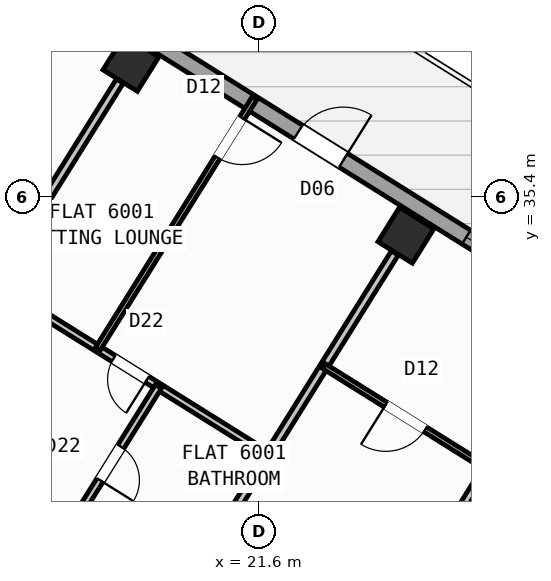
"""IFC4 building model, lengths in metres.
Left out: names, types, materials, properties, quantities, classifications, styles, units other than length and angle.
Written with IfcOpenShell. Run it as: python <this file> out.ifc"""

import sys

from ifc_helpers import new_model, si_unit, direction, frame, frame_2d, origin, origin_2d, place, context, subcontext, project, spatial, rectangle, hollow_rectangle, extrude, source, transform, mapped, element, fill, save


model = new_model("IFC4")
c1 = context("Model", 3, precision=1e-05, world=origin(), true_north=direction((0.0, 1.0)))
c2 = subcontext(c1, "Body", "Model", "MODEL_VIEW")
j1 = project(units=[si_unit("LENGTHUNIT", "METRE"), si_unit("PLANEANGLEUNIT", "RADIAN")], contexts=[c1])
p1 = place(None, origin())
s1 = spatial("IfcSite", under=j1, at=p1, CompositionType="ELEMENT")
p2 = place(p1, origin())
s2 = spatial("IfcBuilding", under=s1, at=p2, CompositionType="ELEMENT")
p3 = place(p2, frame((0.0, 0.0, 238.5)))
s3 = spatial("IfcBuildingStorey", under=s2, at=p3, CompositionType="ELEMENT", Elevation=238.5)
m1 = source(origin(), c2, "Body", "SweptSolid", [
    extrude(hollow_rectangle(XDim=0.8, YDim=0.8, WallThickness=0.032, at=origin_2d()), origin(), (0.0, 0.0, 1.0), 3.6),
])
for number, where, z_axis, x_axis in (
    (1, (24.5, 34.643, 0.0), (0.0, 0.0, 1.0), (-0.848, 0.53, 0.0)),
    (2, (19.073, 38.034, 0.0), (0.0, 0.0, 1.0), (-0.848, 0.53, 0.0)),
):
    element("IfcColumn", number, at=place(p3, frame(where, z_axis=z_axis, x_axis=x_axis)), inside=s3, PredefinedType="COLUMN", context=c2, shape_type="MappedRepresentation", body=[
        mapped(m1, transform((0.0, 0.0, 0.0), scale=1.0)),
    ])
p4 = place(p3, frame((14.138, 41.825, 0.0), z_axis=(0.0, 0.0, 1.0), x_axis=(0.848046498049, -0.529921821731, 0.0)))
e3 = element("IfcWall", 3, at=p4, inside=s3, PredefinedType="STANDARD", context=c2, shape_type="SweptSolid", body=[
    extrude(rectangle(XDim=31.588, YDim=0.32, at=frame_2d((15.794, 0.0))), origin(), (0.0, 0.0, 1.0), 3.35),
])
p5 = place(p4, frame((9.712, 0.0, 0.0)))
e4 = element("IfcOpeningElement", 4, at=p5, cuts=e3, PredefinedType="OPENING", context=c2, shape_type="SweptSolid", body=[
    extrude(rectangle(XDim=1.05, YDim=2.15, at=frame_2d((0.525, 1.075))), frame((0.0, 0.17, 0.0), z_axis=(0.0, -1.0, 0.0), x_axis=(1.0, 0.0, 0.0)), (0.0, 0.0, 1.0), 0.34),
])
p6 = place(p4, frame((0.841, 0.0, 0.9)))
e5 = element("IfcOpeningElement", 5, at=p6, cuts=e3, PredefinedType="OPENING", context=c2, shape_type="SweptSolid", body=[
    extrude(rectangle(XDim=1.65, YDim=1.45, at=frame_2d((0.825, 0.725))), frame((0.0, 0.17, 0.0), z_axis=(0.0, -1.0, 0.0), x_axis=(1.0, 0.0, 0.0)), (0.0, 0.0, 1.0), 0.34),
])
p7 = place(p4, frame((4.171, 0.0, 1.0)))
e6 = element("IfcOpeningElement", 6, at=p7, cuts=e3, PredefinedType="OPENING", context=c2, shape_type="SweptSolid", body=[
    extrude(rectangle(XDim=0.9, YDim=1.25, at=frame_2d((0.45, 0.625))), frame((0.0, 0.17, 0.0), z_axis=(0.0, -1.0, 0.0), x_axis=(1.0, 0.0, 0.0)), (0.0, 0.0, 1.0), 0.34),
])
p8 = place(p4, frame((13.624, 0.0, 0.95)))
e7 = element("IfcOpeningElement", 7, at=p8, cuts=e3, PredefinedType="OPENING", context=c2, shape_type="SweptSolid", body=[
    extrude(rectangle(XDim=1.95, YDim=1.35, at=frame_2d((0.975, 0.675))), frame((0.0, 0.17, 0.0), z_axis=(0.0, -1.0, 0.0), x_axis=(1.0, 0.0, 0.0)), (0.0, 0.0, 1.0), 0.34),
])
p9 = place(p4, frame((17.129, 0.0, 1.0)))
e8 = element("IfcOpeningElement", 8, at=p9, cuts=e3, PredefinedType="OPENING", context=c2, shape_type="SweptSolid", body=[
    extrude(rectangle(XDim=0.9, YDim=1.25, at=frame_2d((0.45, 0.625))), frame((0.0, 0.17, 0.0), z_axis=(0.0, -1.0, 0.0), x_axis=(1.0, 0.0, 0.0)), (0.0, 0.0, 1.0), 0.34),
])
p10 = place(p4, frame((21.744, 0.0, 0.9)))
e9 = element("IfcOpeningElement", 9, at=p10, cuts=e3, PredefinedType="OPENING", context=c2, shape_type="SweptSolid", body=[
    extrude(rectangle(XDim=1.65, YDim=1.45, at=frame_2d((0.825, 0.725))), frame((0.0, 0.17, 0.0), z_axis=(0.0, -1.0, 0.0), x_axis=(1.0, 0.0, 0.0)), (0.0, 0.0, 1.0), 0.34),
])
p11 = place(p4, frame((27.394, 0.0, 0.9)))
e10 = element("IfcOpeningElement", 10, at=p11, cuts=e3, PredefinedType="OPENING", context=c2, shape_type="SweptSolid", body=[
    extrude(rectangle(XDim=1.65, YDim=1.45, at=frame_2d((0.825, 0.725))), frame((0.0, 0.17, 0.0), z_axis=(0.0, -1.0, 0.0), x_axis=(1.0, 0.0, 0.0)), (0.0, 0.0, 1.0), 0.34),
])
p12 = place(p3, frame((27.953, 33.016, 0.0), z_axis=(0.0, 0.0, 1.0), x_axis=(-0.529903001606, -0.848058257957, 0.0)))
e11 = element("IfcWall", 11, at=p12, inside=s3, PredefinedType="PARTITIONING", context=c2, shape_type="SweptSolid", body=[
    extrude(rectangle(XDim=9.15, YDim=0.16, at=frame_2d((4.575, 0.0))), origin(), (0.0, 0.0, 1.0), 3.34),
])
p13 = place(p3, frame((23.104, 25.256, 0.0), z_axis=(0.0, 0.0, 1.0), x_axis=(-0.848041752158, 0.529929416617, 0.0)))
e12 = element("IfcWall", 12, at=p13, inside=s3, PredefinedType="PARTITIONING", context=c2, shape_type="SweptSolid", body=[
    extrude(rectangle(XDim=16.73, YDim=0.16, at=frame_2d((8.365, 0.0))), origin(), (0.0, 0.0, 1.0), 3.34),
])
p14 = place(p13, frame((1.395, 0.0, 0.0)))
e13 = element("IfcOpeningElement", 13, at=p14, cuts=e12, PredefinedType="OPENING", context=c2, shape_type="SweptSolid", body=[
    extrude(rectangle(XDim=1.0, YDim=2.1, at=frame_2d((0.5, 1.05))), frame((0.0, 0.09, 0.0), z_axis=(0.0, -1.0, 0.0), x_axis=(1.0, 0.0, 0.0)), (0.0, 0.0, 1.0), 0.18),
])
p15 = place(p13, frame((7.82, 0.0, 0.0)))
e14 = element("IfcOpeningElement", 14, at=p15, cuts=e12, PredefinedType="OPENING", context=c2, shape_type="SweptSolid", body=[
    extrude(rectangle(XDim=1.0, YDim=2.1, at=frame_2d((0.5, 1.05))), frame((0.0, 0.09, 0.0), z_axis=(0.0, -1.0, 0.0), x_axis=(1.0, 0.0, 0.0)), (0.0, 0.0, 1.0), 0.18),
])
p16 = place(p13, frame((11.14, 0.0, 0.0)))
e15 = element("IfcOpeningElement", 15, at=p16, cuts=e12, PredefinedType="OPENING", context=c2, shape_type="SweptSolid", body=[
    extrude(rectangle(XDim=1.0, YDim=2.1, at=frame_2d((0.5, 1.05))), frame((0.0, 0.09, 0.0), z_axis=(0.0, -1.0, 0.0), x_axis=(1.0, 0.0, 0.0)), (0.0, 0.0, 1.0), 0.18),
])
p17 = place(p3, frame((21.938, 23.391, 0.0), z_axis=(0.0, 0.0, 1.0), x_axis=(-0.848045850158, 0.529922858565, 0.0)))
e16 = element("IfcWall", 16, at=p17, inside=s3, PredefinedType="PARTITIONING", context=c2, shape_type="SweptSolid", body=[
    extrude(rectangle(XDim=16.73, YDim=0.16, at=frame_2d((8.365, 0.0))), origin(), (0.0, 0.0, 1.0), 3.34),
])
p18 = place(p17, frame((0.92, 0.0, 0.0)))
e17 = element("IfcOpeningElement", 17, at=p18, cuts=e16, PredefinedType="OPENING", context=c2, shape_type="SweptSolid", body=[
    extrude(rectangle(XDim=1.0, YDim=2.1, at=frame_2d((0.5, 1.05))), frame((0.0, 0.09, 0.0), z_axis=(0.0, -1.0, 0.0), x_axis=(1.0, 0.0, 0.0)), (0.0, 0.0, 1.0), 0.18),
])
p19 = place(p17, frame((3.928, 0.0, 0.0)))
e18 = element("IfcOpeningElement", 18, at=p19, cuts=e16, PredefinedType="OPENING", context=c2, shape_type="SweptSolid", body=[
    extrude(rectangle(XDim=1.0, YDim=2.1, at=frame_2d((0.5, 1.05))), frame((0.0, 0.09, 0.0), z_axis=(0.0, -1.0, 0.0), x_axis=(1.0, 0.0, 0.0)), (0.0, 0.0, 1.0), 0.18),
])
p20 = place(p17, frame((7.271, 0.0, 0.0)))
e19 = element("IfcOpeningElement", 19, at=p20, cuts=e16, PredefinedType="OPENING", context=c2, shape_type="SweptSolid", body=[
    extrude(rectangle(XDim=1.0, YDim=2.1, at=frame_2d((0.5, 1.05))), frame((0.0, 0.09, 0.0), z_axis=(0.0, -1.0, 0.0), x_axis=(1.0, 0.0, 0.0)), (0.0, 0.0, 1.0), 0.18),
])
p21 = place(p17, frame((10.78, 0.0, 0.0)))
e20 = element("IfcOpeningElement", 20, at=p21, cuts=e16, PredefinedType="OPENING", context=c2, shape_type="SweptSolid", body=[
    extrude(rectangle(XDim=1.0, YDim=2.1, at=frame_2d((0.5, 1.05))), frame((0.0, 0.09, 0.0), z_axis=(0.0, -1.0, 0.0), x_axis=(1.0, 0.0, 0.0)), (0.0, 0.0, 1.0), 0.18),
])
p22 = place(p17, frame((14.372, 0.0, 0.0)))
e21 = element("IfcOpeningElement", 21, at=p22, cuts=e16, PredefinedType="OPENING", context=c2, shape_type="SweptSolid", body=[
    extrude(rectangle(XDim=1.0, YDim=2.1, at=frame_2d((0.5, 1.05))), frame((0.0, 0.09, 0.0), z_axis=(0.0, -1.0, 0.0), x_axis=(1.0, 0.0, 0.0)), (0.0, 0.0, 1.0), 0.18),
])
p23 = place(p3, frame((24.282, 34.293, 0.0), z_axis=(0.0, 0.0, 1.0), x_axis=(-0.529934553702, -0.848038542045, 0.0)))
e22 = element("IfcWall", 22, at=p23, inside=s3, PredefinedType="PARTITIONING", context=c2, shape_type="SweptSolid", body=[
    extrude(rectangle(XDim=6.476, YDim=0.16, at=frame_2d((3.238, 0.0))), origin(), (0.0, 0.0, 1.0), 2.875),
])
p24 = place(p3, frame((26.099, 30.05, 0.0), z_axis=(0.0, 0.0, 1.0), x_axis=(-0.84803087207, 0.529946827537, 0.0)))
e23 = element("IfcWall", 23, at=p24, inside=s3, PredefinedType="PARTITIONING", context=c2, shape_type="SweptSolid", body=[
    extrude(rectangle(XDim=3.79, YDim=0.11, at=frame_2d((1.895, 0.0))), origin(), (0.0, 0.0, 1.0), 3.34),
])
p25 = place(p24, frame((1.435, 0.0, 0.0)))
e24 = element("IfcOpeningElement", 24, at=p25, cuts=e23, PredefinedType="OPENING", context=c2, shape_type="SweptSolid", body=[
    extrude(rectangle(XDim=0.92, YDim=2.08, at=frame_2d((0.46, 1.04))), frame((0.0, 0.065, 0.0), z_axis=(0.0, -1.0, 0.0), x_axis=(1.0, 0.0, 0.0)), (0.0, 0.0, 1.0), 0.13),
])
p26 = place(p3, frame((18.854, 37.685, 0.0), z_axis=(0.0, 0.0, 1.0), x_axis=(-0.529907440938, -0.848055484057, 0.0)))
e25 = element("IfcWall", 25, at=p26, inside=s3, PredefinedType="PARTITIONING", context=c2, shape_type="SweptSolid", body=[
    extrude(rectangle(XDim=6.476, YDim=0.16, at=frame_2d((3.238, 0.0))), origin(), (0.0, 0.0, 1.0), 2.875),
])
p27 = place(p3, frame((21.787, 30.301, 0.0), z_axis=(0.0, 0.0, 1.0), x_axis=(-0.848049732085, 0.529916646191, 0.0)))
e26 = element("IfcWall", 26, at=p27, inside=s3, PredefinedType="PLUMBINGWALL", context=c2, shape_type="SweptSolid", body=[
    extrude(rectangle(XDim=6.4, YDim=0.14, at=frame_2d((3.2, 0.0))), origin(), (0.0, 0.0, 1.0), 3.34),
])
p28 = place(p27, frame((2.824, 0.0, 0.0)))
e27 = element("IfcOpeningElement", 27, at=p28, cuts=e26, PredefinedType="OPENING", context=c2, shape_type="SweptSolid", body=[
    extrude(rectangle(XDim=0.78, YDim=2.05, at=frame_2d((0.39, 1.025))), frame((0.0, 0.08, 0.0), z_axis=(0.0, -1.0, 0.0), x_axis=(1.0, 0.0, 0.0)), (0.0, 0.0, 1.0), 0.16),
])
p29 = place(p3, frame((19.616, 31.657, 0.0), z_axis=(0.0, 0.0, 1.0), x_axis=(-0.529876336437, -0.84807491891, 0.0)))
e28 = element("IfcWall", 28, at=p29, inside=s3, PredefinedType="PLUMBINGWALL", context=c2, shape_type="SweptSolid", body=[
    extrude(rectangle(XDim=3.58, YDim=0.14, at=frame_2d((1.79, 0.0))), origin(), (0.0, 0.0, 1.0), 3.34),
])
p30 = place(p29, frame((1.4, 0.0, 0.0)))
e29 = element("IfcOpeningElement", 29, at=p30, cuts=e28, PredefinedType="OPENING", context=c2, shape_type="SweptSolid", body=[
    extrude(rectangle(XDim=0.78, YDim=2.05, at=frame_2d((0.39, 1.025))), frame((0.0, 0.08, 0.0), z_axis=(0.0, -1.0, 0.0), x_axis=(1.0, 0.0, 0.0)), (0.0, 0.0, 1.0), 0.16),
])
p31 = place(p3, frame((21.517, 37.356, 0.0), z_axis=(0.0, 0.0, 1.0), x_axis=(-0.529916267533, -0.848049968695, 0.0)))
e30 = element("IfcWall", 30, at=p31, inside=s3, PredefinedType="PARTITIONING", context=c2, shape_type="SweptSolid", body=[
    extrude(rectangle(XDim=5.84, YDim=0.11, at=frame_2d((2.92, 0.0))), origin(), (0.0, 0.0, 1.0), 3.34),
])
p32 = place(p31, frame((0.47, 0.0, 0.0)))
e31 = element("IfcOpeningElement", 31, at=p32, cuts=e30, PredefinedType="OPENING", context=c2, shape_type="SweptSolid", body=[
    extrude(rectangle(XDim=0.92, YDim=2.08, at=frame_2d((0.46, 1.04))), frame((0.0, 0.065, 0.0), z_axis=(0.0, -1.0, 0.0), x_axis=(1.0, 0.0, 0.0)), (0.0, 0.0, 1.0), 0.13),
])
m2 = source(origin(), c2, "Body", "SweptSolid", [
    extrude(rectangle(XDim=1.05, YDim=2.15, at=frame_2d((0.525, 1.075))), frame((0.0, 0.025, 0.0), z_axis=(0.0, -1.0, 0.0), x_axis=(1.0, 0.0, 0.0)), (0.0, 0.0, 1.0), 0.05),
])
p33 = place(p5, origin())
e32 = element("IfcDoor", 32, at=p33, inside=s3, OperationType="SINGLE_SWING_RIGHT", PredefinedType="DOOR", context=c2, shape_type="MappedRepresentation", body=[
    mapped(m2, transform((0.0, 0.0, 0.0), scale=1.0)),
])
fill(e4, e32)
m3 = source(origin(), c2, "Body", "SweptSolid", [
    extrude(rectangle(XDim=1.95, YDim=1.35, at=frame_2d((0.975, 0.675))), frame((0.0, 0.03, 0.0), z_axis=(0.0, -1.0, 0.0), x_axis=(1.0, 0.0, 0.0)), (0.0, 0.0, 1.0), 0.06),
])
p34 = place(p8, origin())
e33 = element("IfcWindow", 33, at=p34, inside=s3, PartitioningType="SINGLE_PANEL", PredefinedType="WINDOW", context=c2, shape_type="MappedRepresentation", body=[
    mapped(m3, transform((0.0, 0.0, 0.0), scale=1.0)),
])
fill(e7, e33)
m4 = source(origin(), c2, "Body", "SweptSolid", [
    extrude(rectangle(XDim=0.92, YDim=2.08, at=frame_2d((0.46, 1.04))), frame((0.0, 0.025, 0.0), z_axis=(0.0, -1.0, 0.0), x_axis=(1.0, 0.0, 0.0)), (0.0, 0.0, 1.0), 0.05),
])
p35 = place(p25, origin())
e34 = element("IfcDoor", 34, at=p35, inside=s3, OperationType="SINGLE_SWING_RIGHT", PredefinedType="DOOR", context=c2, shape_type="MappedRepresentation", body=[
    mapped(m4, transform((0.0, 0.0, 0.0), scale=1.0)),
])
fill(e24, e34)
p36 = place(p32, origin())
e35 = element("IfcDoor", 35, at=p36, inside=s3, OperationType="SINGLE_SWING_LEFT", PredefinedType="DOOR", context=c2, shape_type="MappedRepresentation", body=[
    mapped(m4, transform((0.0, 0.0, 0.0), scale=1.0)),
])
fill(e31, e35)
m5 = source(origin(), c2, "Body", "SweptSolid", [
    extrude(rectangle(XDim=0.78, YDim=2.05, at=frame_2d((0.39, 1.025))), frame((0.0, 0.025, 0.0), z_axis=(0.0, -1.0, 0.0), x_axis=(1.0, 0.0, 0.0)), (0.0, 0.0, 1.0), 0.05),
])
p37 = place(p28, origin())
e36 = element("IfcDoor", 36, at=p37, inside=s3, OperationType="SINGLE_SWING_LEFT", PredefinedType="DOOR", context=c2, shape_type="MappedRepresentation", body=[
    mapped(m5, transform((0.0, 0.0, 0.0), scale=1.0)),
])
fill(e27, e36)
p38 = place(p30, origin())
e37 = element("IfcDoor", 37, at=p38, inside=s3, OperationType="SINGLE_SWING_RIGHT", PredefinedType="DOOR", context=c2, shape_type="MappedRepresentation", body=[
    mapped(m5, transform((0.0, 0.0, 0.0), scale=1.0)),
])
fill(e29, e37)
save(model, sys.argv[1])
